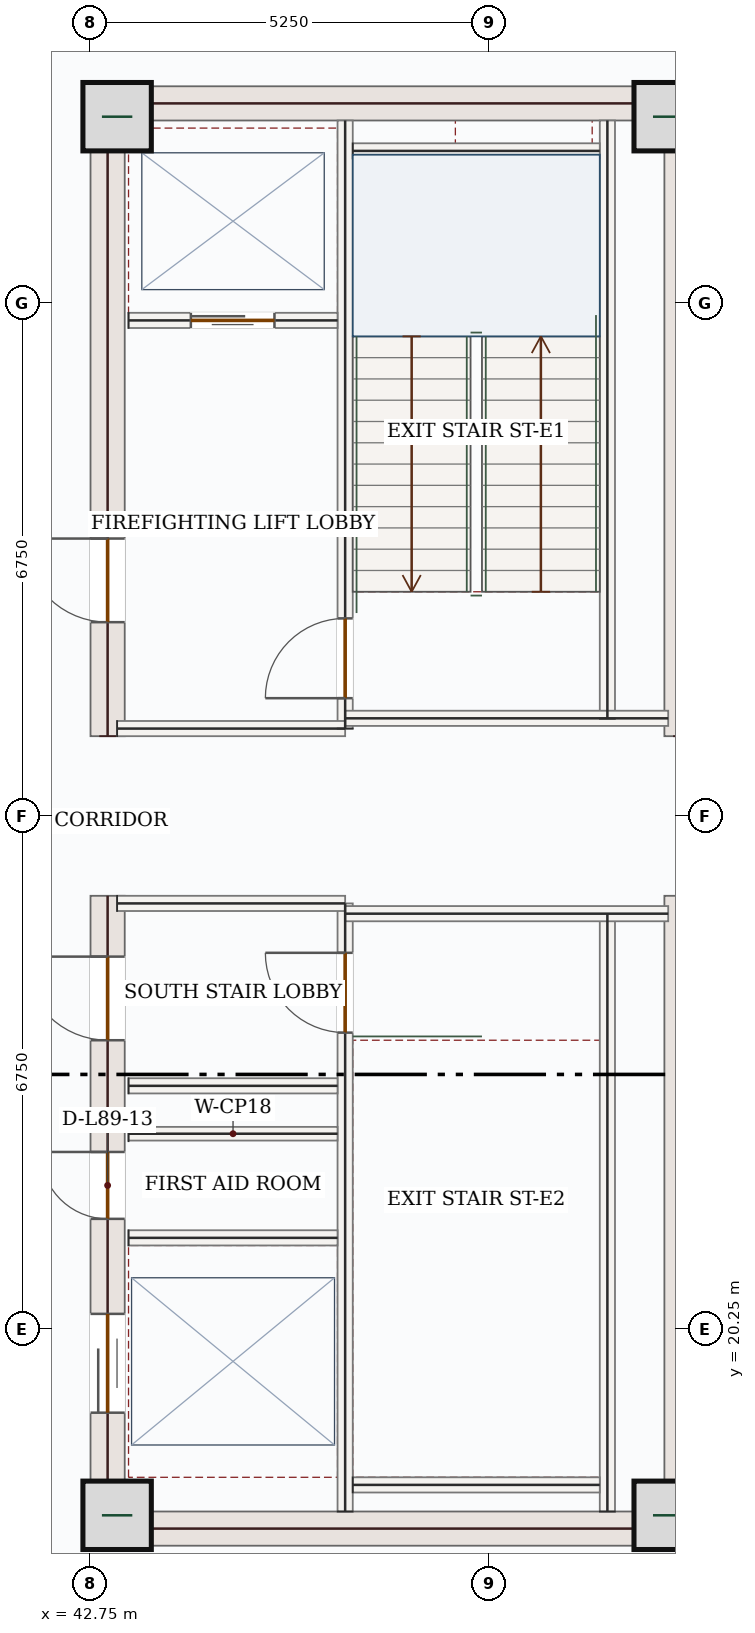
"""IFC4 building model, lengths in metres.
Left out: names, types, materials, properties, quantities, classifications, styles, units other than length and angle.
Written with IfcOpenShell. Run it as: python <this file> out.ifc"""

import sys

from ifc_helpers import new_model, si_unit, direction, frame, frame_2d, origin, origin_2d, place, context, subcontext, project, spatial, rectangle, extrude, source, transform, mapped, element, fill, save


model = new_model("IFC4")
c1 = context("Model", 3, precision=1e-05, world=origin(), true_north=direction((0.0, 1.0)))
c2 = subcontext(c1, "Body", "Model", "MODEL_VIEW")
j1 = project(units=[si_unit("LENGTHUNIT", "METRE"), si_unit("PLANEANGLEUNIT", "RADIAN")], contexts=[c1])
p1 = place(None, origin())
s1 = spatial("IfcSite", under=j1, at=p1, CompositionType="ELEMENT")
p2 = place(p1, origin())
s2 = spatial("IfcBuilding", under=s1, at=p2, CompositionType="ELEMENT")
p3 = place(p2, frame((0.0, 0.0, 365.85)))
s3 = spatial("IfcBuildingStorey", under=s2, at=p3, CompositionType="ELEMENT", Elevation=365.85)
p4 = place(p3, frame((42.975, 17.4, 0.0), z_axis=(0.0, 0.0, 1.0), x_axis=(0.0, 1.0, 0.0)))
e1 = element("IfcWall", 1, at=p4, inside=s3, PredefinedType="SHEAR", context=c2, shape_type="SweptSolid", body=[
    extrude(rectangle(XDim=8.55, YDim=0.45, at=frame_2d((4.275, 0.0))), origin(), (0.0, 0.0, 1.0), 4.55),
])
p5 = place(p4, frame((6.65, 0.0, 0.0)))
e2 = element("IfcOpeningElement", 2, at=p5, cuts=e1, PredefinedType="OPENING", context=c2, shape_type="SweptSolid", body=[
    extrude(rectangle(XDim=1.1, YDim=2.2, at=frame_2d((0.55, 1.1))), frame((0.0, 0.235, 0.0), z_axis=(0.0, -1.0, 0.0), x_axis=(1.0, 0.0, 0.0)), (0.0, 0.0, 1.0), 0.47),
])
p6 = place(p4, frame((1.75, 0.0, 0.0)))
e3 = element("IfcOpeningElement", 3, at=p6, cuts=e1, PredefinedType="OPENING", context=c2, shape_type="SweptSolid", body=[
    extrude(rectangle(XDim=1.3, YDim=2.2, at=frame_2d((0.65, 1.1))), frame((0.0, 0.235, 0.0), z_axis=(0.0, -1.0, 0.0), x_axis=(1.0, 0.0, 0.0)), (0.0, 0.0, 1.0), 0.47),
])
p7 = place(p4, frame((4.3, 0.0, 0.0)))
e4 = element("IfcOpeningElement", 4, at=p7, cuts=e1, PredefinedType="OPENING", context=c2, shape_type="SweptSolid", body=[
    extrude(rectangle(XDim=0.88, YDim=2.1, at=frame_2d((0.44, 1.05))), frame((0.0, 0.235, 0.0), z_axis=(0.0, -1.0, 0.0), x_axis=(1.0, 0.0, 0.0)), (0.0, 0.0, 1.0), 0.47),
])
p8 = place(p3, frame((42.975, 28.05, 0.0), z_axis=(0.0, 0.0, 1.0), x_axis=(0.0, 1.0, 0.0)))
e5 = element("IfcWall", 5, at=p8, inside=s3, PredefinedType="SHEAR", context=c2, shape_type="SweptSolid", body=[
    extrude(rectangle(XDim=8.55, YDim=0.45, at=frame_2d((4.275, 0.0))), origin(), (0.0, 0.0, 1.0), 4.55),
])
p9 = place(p8, frame((1.5, 0.0, 0.0)))
e6 = element("IfcOpeningElement", 6, at=p9, cuts=e5, PredefinedType="OPENING", context=c2, shape_type="SweptSolid", body=[
    extrude(rectangle(XDim=1.1, YDim=2.2, at=frame_2d((0.55, 1.1))), frame((0.0, 0.235, 0.0), z_axis=(0.0, -1.0, 0.0), x_axis=(1.0, 0.0, 0.0)), (0.0, 0.0, 1.0), 0.47),
])
m1 = source(origin(), c2, "Body", "SweptSolid", [
    extrude(rectangle(XDim=8.55, YDim=0.45, at=frame_2d((4.275, 0.0))), origin(), (0.0, 0.0, 1.0), 4.55),
])
for number, where, z_axis, x_axis in (
    (7, (50.525, 17.4, 0.0), (0.0, 0.0, 1.0), (0.0, 1.0, 0.0)),
    (8, (50.525, 28.05, 0.0), (0.0, 0.0, 1.0), (0.0, 1.0, 0.0)),
):
    element("IfcWall", number, at=place(p3, frame(where, z_axis=z_axis, x_axis=x_axis)), inside=s3, PredefinedType="SHEAR", context=c2, shape_type="MappedRepresentation", body=[
        mapped(m1, transform((0.0, 0.0, 0.0), x_axis=(1.0, 0.0, 0.0), y_axis=(0.0, 1.0, 0.0), z_axis=(0.0, 0.0, 1.0), scale=1.0)),
    ])
m2 = source(origin(), c2, "Body", "SweptSolid", [
    extrude(rectangle(XDim=7.1, YDim=0.45, at=frame_2d((3.55, 0.0))), origin(), (0.0, 0.0, 1.0), 4.55),
])
for number, where, z_axis, x_axis in (
    (9, (43.2, 17.625, 0.0), (0.0, 0.0, 1.0), (1.0, 0.0, 0.0)),
    (10, (43.2, 36.375, 0.0), (0.0, 0.0, 1.0), (1.0, 0.0, 0.0)),
):
    element("IfcWall", number, at=place(p3, frame(where, z_axis=z_axis, x_axis=x_axis)), inside=s3, PredefinedType="SHEAR", context=c2, shape_type="MappedRepresentation", body=[
        mapped(m2, transform((0.0, 0.0, 0.0), x_axis=(1.0, 0.0, 0.0), y_axis=(0.0, 1.0, 0.0), z_axis=(0.0, 0.0, 1.0), scale=1.0)),
    ])
m3 = source(origin(), c2, "Body", "SweptSolid", [
    extrude(rectangle(XDim=0.9, YDim=0.9, at=origin_2d()), origin(), (0.0, 0.0, 1.0), 4.8),
])
for number, where, z_axis, x_axis in (
    (11, (43.1, 17.8, 0.0), (0.0, 0.0, 1.0), (1.0, 0.0, 0.0)),
    (12, (50.35, 17.8, 0.0), (0.0, 0.0, 1.0), (1.0, 0.0, 0.0)),
    (13, (43.1, 36.2, 0.0), (0.0, 0.0, 1.0), (1.0, 0.0, 0.0)),
    (14, (50.35, 36.2, 0.0), (0.0, 0.0, 1.0), (1.0, 0.0, 0.0)),
):
    element("IfcColumn", number, at=place(p3, frame(where, z_axis=z_axis, x_axis=x_axis)), inside=s3, PredefinedType="COLUMN", context=c2, shape_type="MappedRepresentation", body=[
        mapped(m3, transform((0.0, 0.0, 0.0), x_axis=(1.0, 0.0, 0.0), y_axis=(0.0, 1.0, 0.0), z_axis=(0.0, 0.0, 1.0), scale=1.0)),
    ])
p10 = place(p3, frame((49.342, 39.26, 0.0), z_axis=(0.0, 0.0, 1.0), x_axis=(0.707106781187, -0.707106781187, 0.0)))
e15 = element("IfcWall", 15, at=p10, inside=s3, PredefinedType="SOLIDWALL", context=c2, shape_type="SweptSolid", body=[
    extrude(rectangle(XDim=5.258, YDim=0.28, at=frame_2d((2.629, 0.0))), origin(), (0.0, 0.0, 1.0), 4.55),
])
p11 = place(p10, frame((1.879, 0.0, 0.85)))
e16 = element("IfcOpeningElement", 16, at=p11, cuts=e15, PredefinedType="OPENING", context=c2, shape_type="SweptSolid", body=[
    extrude(rectangle(XDim=1.5, YDim=1.5, at=frame_2d((0.75, 0.75))), frame((0.0, 0.15, 0.0), z_axis=(0.0, -1.0, 0.0), x_axis=(1.0, 0.0, 0.0)), (0.0, 0.0, 1.0), 0.3),
])
p12 = place(p3, frame((53.06, 18.458, 0.0), z_axis=(0.0, 0.0, 1.0), x_axis=(-0.707106781187, -0.707106781187, 0.0)))
e17 = element("IfcWall", 17, at=p12, inside=s3, PredefinedType="SOLIDWALL", context=c2, shape_type="SweptSolid", body=[
    extrude(rectangle(XDim=5.258, YDim=0.28, at=frame_2d((2.629, 0.0))), origin(), (0.0, 0.0, 1.0), 4.55),
])
p13 = place(p12, frame((1.879, 0.0, 0.85)))
e18 = element("IfcOpeningElement", 18, at=p13, cuts=e17, PredefinedType="OPENING", context=c2, shape_type="SweptSolid", body=[
    extrude(rectangle(XDim=1.5, YDim=1.5, at=frame_2d((0.75, 0.75))), frame((0.0, 0.15, 0.0), z_axis=(0.0, -1.0, 0.0), x_axis=(1.0, 0.0, 0.0)), (0.0, 0.0, 1.0), 0.3),
])
m4 = source(origin(), c2, "Body", "SweptSolid", [
    extrude(rectangle(XDim=7.87, YDim=0.2, at=frame_2d((3.935, 0.0))), origin(), (0.0, 0.0, 1.0), 4.55),
])
for number, where, z_axis, x_axis in (
    (19, (49.55, 17.85, 0.0), (0.0, 0.0, 1.0), (0.0, 1.0, 0.0)),
    (20, (49.55, 28.28, 0.0), (0.0, 0.0, 1.0), (0.0, 1.0, 0.0)),
):
    element("IfcWall", number, at=place(p3, frame(where, z_axis=z_axis, x_axis=x_axis)), inside=s3, PredefinedType="SOLIDWALL", context=c2, shape_type="MappedRepresentation", body=[
        mapped(m4, transform((0.0, 0.0, 0.0), x_axis=(1.0, 0.0, 0.0), y_axis=(0.0, 1.0, 0.0), z_axis=(0.0, 0.0, 1.0), scale=1.0)),
    ])
p14 = place(p3, frame((46.1, 17.85, 0.0), z_axis=(0.0, 0.0, 1.0), x_axis=(0.0, 1.0, 0.0)))
e21 = element("IfcWall", 21, at=p14, inside=s3, PredefinedType="SOLIDWALL", context=c2, shape_type="SweptSolid", body=[
    extrude(rectangle(XDim=8.0, YDim=0.2, at=frame_2d((4.0, 0.0))), origin(), (0.0, 0.0, 1.0), 4.55),
])
p15 = place(p14, frame((6.3, 0.0, 0.0)))
e22 = element("IfcOpeningElement", 22, at=p15, cuts=e21, PredefinedType="OPENING", context=c2, shape_type="SweptSolid", body=[
    extrude(rectangle(XDim=1.05, YDim=2.15, at=frame_2d((0.525, 1.075))), frame((0.0, 0.11, 0.0), z_axis=(0.0, -1.0, 0.0), x_axis=(1.0, 0.0, 0.0)), (0.0, 0.0, 1.0), 0.22),
])
p16 = place(p3, frame((46.1, 28.15, 0.0), z_axis=(0.0, 0.0, 1.0), x_axis=(0.0, 1.0, 0.0)))
e23 = element("IfcWall", 23, at=p16, inside=s3, PredefinedType="SOLIDWALL", context=c2, shape_type="SweptSolid", body=[
    extrude(rectangle(XDim=8.0, YDim=0.2, at=frame_2d((4.0, 0.0))), origin(), (0.0, 0.0, 1.0), 4.55),
])
p17 = place(p16, frame((0.4, 0.0, 0.0)))
e24 = element("IfcOpeningElement", 24, at=p17, cuts=e23, PredefinedType="OPENING", context=c2, shape_type="SweptSolid", body=[
    extrude(rectangle(XDim=1.05, YDim=2.15, at=frame_2d((0.525, 1.075))), frame((0.0, 0.11, 0.0), z_axis=(0.0, -1.0, 0.0), x_axis=(1.0, 0.0, 0.0)), (0.0, 0.0, 1.0), 0.22),
])
m5 = source(origin(), c2, "Body", "SweptSolid", [
    extrude(rectangle(XDim=3.0, YDim=0.2, at=frame_2d((1.5, 0.0))), origin(), (0.0, 0.0, 1.0), 4.55),
])
p18 = place(p3, frame((43.1, 25.85, 0.0), z_axis=(0.0, 0.0, 1.0), x_axis=(1.0, 0.0, 0.0)))
e25 = element("IfcWall", 25, at=p18, inside=s3, PredefinedType="SOLIDWALL", context=c2, shape_type="MappedRepresentation", body=[
    mapped(m5, transform((0.0, 0.0, 0.0), x_axis=(1.0, 0.0, 0.0), y_axis=(0.0, 1.0, 0.0), z_axis=(0.0, 0.0, 1.0), scale=1.0)),
])
m6 = source(origin(), c2, "Body", "SweptSolid", [
    extrude(rectangle(XDim=4.25, YDim=0.2, at=frame_2d((2.125, 0.0))), origin(), (0.0, 0.0, 1.0), 4.55),
])
p19 = place(p3, frame((46.1, 25.715, 0.0), z_axis=(0.0, 0.0, 1.0), x_axis=(1.0, 0.0, 0.0)))
e26 = element("IfcWall", 26, at=p19, inside=s3, PredefinedType="SOLIDWALL", context=c2, shape_type="MappedRepresentation", body=[
    mapped(m6, transform((0.0, 0.0, 0.0), x_axis=(1.0, 0.0, 0.0), y_axis=(0.0, 1.0, 0.0), z_axis=(0.0, 0.0, 1.0), scale=1.0)),
])
p20 = place(p3, frame((43.1, 28.15, 0.0), z_axis=(0.0, 0.0, 1.0), x_axis=(1.0, 0.0, 0.0)))
e27 = element("IfcWall", 27, at=p20, inside=s3, PredefinedType="SOLIDWALL", context=c2, shape_type="MappedRepresentation", body=[
    mapped(m5, transform((0.0, 0.0, 0.0), x_axis=(1.0, 0.0, 0.0), y_axis=(0.0, 1.0, 0.0), z_axis=(0.0, 0.0, 1.0), scale=1.0)),
])
p21 = place(p3, frame((46.1, 28.285, 0.0), z_axis=(0.0, 0.0, 1.0), x_axis=(1.0, 0.0, 0.0)))
e28 = element("IfcWall", 28, at=p21, inside=s3, PredefinedType="SOLIDWALL", context=c2, shape_type="MappedRepresentation", body=[
    mapped(m6, transform((0.0, 0.0, 0.0), x_axis=(1.0, 0.0, 0.0), y_axis=(0.0, 1.0, 0.0), z_axis=(0.0, 0.0, 1.0), scale=1.0)),
])
m7 = source(origin(), c2, "Body", "SweptSolid", [
    extrude(rectangle(XDim=3.25, YDim=0.2, at=frame_2d((1.625, 0.0))), origin(), (0.0, 0.0, 1.0), 4.55),
])
for number, where, z_axis, x_axis in (
    (29, (46.2, 35.75, 0.0), (0.0, 0.0, 1.0), (1.0, 0.0, 0.0)),
    (30, (46.2, 18.2, 0.0), (0.0, 0.0, 1.0), (1.0, 0.0, 0.0)),
):
    element("IfcWall", number, at=place(p3, frame(where, z_axis=z_axis, x_axis=x_axis)), inside=s3, PredefinedType="SOLIDWALL", context=c2, shape_type="MappedRepresentation", body=[
        mapped(m7, transform((0.0, 0.0, 0.0), x_axis=(1.0, 0.0, 0.0), y_axis=(0.0, 1.0, 0.0), z_axis=(0.0, 0.0, 1.0), scale=1.0)),
    ])
p22 = place(p3, frame((43.25, 33.52, 0.0), z_axis=(0.0, 0.0, 1.0), x_axis=(1.0, 0.0, 0.0)))
e31 = element("IfcWall", 31, at=p22, inside=s3, PredefinedType="SOLIDWALL", context=c2, shape_type="SweptSolid", body=[
    extrude(rectangle(XDim=2.75, YDim=0.2, at=frame_2d((1.375, 0.0))), origin(), (0.0, 0.0, 1.0), 4.55),
])
p23 = place(p22, frame((0.82, 0.0, 0.0)))
e32 = element("IfcOpeningElement", 32, at=p23, cuts=e31, PredefinedType="OPENING", context=c2, shape_type="SweptSolid", body=[
    extrude(rectangle(XDim=1.1, YDim=2.15, at=frame_2d((0.55, 1.075))), frame((0.0, 0.11, 0.0), z_axis=(0.0, -1.0, 0.0), x_axis=(1.0, 0.0, 0.0)), (0.0, 0.0, 1.0), 0.22),
])
m8 = source(origin(), c2, "Body", "SweptSolid", [
    extrude(rectangle(XDim=2.75, YDim=0.2, at=frame_2d((1.375, 0.0))), origin(), (0.0, 0.0, 1.0), 4.55),
])
for number, where, z_axis, x_axis in (
    (33, (43.25, 23.45, 0.0), (0.0, 0.0, 1.0), (1.0, 0.0, 0.0)),
    (34, (43.25, 21.45, 0.0), (0.0, 0.0, 1.0), (1.0, 0.0, 0.0)),
):
    element("IfcWall", number, at=place(p3, frame(where, z_axis=z_axis, x_axis=x_axis)), inside=s3, PredefinedType="SOLIDWALL", context=c2, shape_type="MappedRepresentation", body=[
        mapped(m8, transform((0.0, 0.0, 0.0), x_axis=(1.0, 0.0, 0.0), y_axis=(0.0, 1.0, 0.0), z_axis=(0.0, 0.0, 1.0), scale=1.0)),
    ])
m9 = source(origin(), c2, "Body", "SweptSolid", [
    extrude(rectangle(XDim=2.75, YDim=0.18, at=frame_2d((1.375, 0.0))), origin(), (0.0, 0.0, 1.0), 4.55),
])
p24 = place(p3, frame((43.25, 22.82, 0.0), z_axis=(0.0, 0.0, 1.0), x_axis=(1.0, 0.0, 0.0)))
e35 = element("IfcWall", 35, at=p24, inside=s3, PredefinedType="PARTITIONING", context=c2, shape_type="MappedRepresentation", body=[
    mapped(m9, transform((0.0, 0.0, 0.0), x_axis=(1.0, 0.0, 0.0), y_axis=(0.0, 1.0, 0.0), z_axis=(0.0, 0.0, 1.0), scale=1.0)),
])
m10 = source(origin(), c2, "Body", "SweptSolid", [
    extrude(rectangle(XDim=1.05, YDim=2.15, at=frame_2d((0.525, 1.075))), frame((0.0, 0.025, 0.0), z_axis=(0.0, -1.0, 0.0), x_axis=(1.0, 0.0, 0.0)), (0.0, 0.0, 1.0), 0.05),
])
p25 = place(p17, origin())
e36 = element("IfcDoor", 36, at=p25, inside=s3, OperationType="SINGLE_SWING_LEFT", PredefinedType="DOOR", context=c2, shape_type="MappedRepresentation", body=[
    mapped(m10, transform((0.0, 0.0, 0.0), x_axis=(1.0, 0.0, 0.0), y_axis=(0.0, 1.0, 0.0), z_axis=(0.0, 0.0, 1.0), scale=1.0)),
])
fill(e24, e36)
p26 = place(p15, origin())
e37 = element("IfcDoor", 37, at=p26, inside=s3, OperationType="SINGLE_SWING_RIGHT", PredefinedType="DOOR", context=c2, shape_type="MappedRepresentation", body=[
    mapped(m10, transform((0.0, 0.0, 0.0), x_axis=(1.0, 0.0, 0.0), y_axis=(0.0, 1.0, 0.0), z_axis=(0.0, 0.0, 1.0), scale=1.0)),
])
fill(e22, e37)
m11 = source(origin(), c2, "Body", "SweptSolid", [
    extrude(rectangle(XDim=1.1, YDim=2.15, at=frame_2d((0.55, 1.075))), frame((0.0, 0.025, 0.0), z_axis=(0.0, -1.0, 0.0), x_axis=(1.0, 0.0, 0.0)), (0.0, 0.0, 1.0), 0.05),
])
p27 = place(p23, origin())
e38 = element("IfcDoor", 38, at=p27, inside=s3, OperationType="DOUBLE_DOOR_SLIDING", PredefinedType="DOOR", context=c2, shape_type="MappedRepresentation", body=[
    mapped(m11, transform((0.0, 0.0, 0.0), x_axis=(1.0, 0.0, 0.0), y_axis=(0.0, 1.0, 0.0), z_axis=(0.0, 0.0, 1.0), scale=1.0)),
])
fill(e32, e38)
m12 = source(origin(), c2, "Body", "SweptSolid", [
    extrude(rectangle(XDim=1.1, YDim=2.2, at=frame_2d((0.55, 1.1))), frame((0.0, 0.025, 0.0), z_axis=(0.0, -1.0, 0.0), x_axis=(1.0, 0.0, 0.0)), (0.0, 0.0, 1.0), 0.05),
])
p28 = place(p9, origin())
e39 = element("IfcDoor", 39, at=p28, inside=s3, OperationType="SINGLE_SWING_RIGHT", PredefinedType="DOOR", context=c2, shape_type="MappedRepresentation", body=[
    mapped(m12, transform((0.0, 0.0, 0.0), x_axis=(1.0, 0.0, 0.0), y_axis=(0.0, 1.0, 0.0), z_axis=(0.0, 0.0, 1.0), scale=1.0)),
])
fill(e6, e39)
p29 = place(p5, origin())
e40 = element("IfcDoor", 40, at=p29, inside=s3, OperationType="SINGLE_SWING_RIGHT", PredefinedType="DOOR", context=c2, shape_type="MappedRepresentation", body=[
    mapped(m12, transform((0.0, 0.0, 0.0), x_axis=(1.0, 0.0, 0.0), y_axis=(0.0, 1.0, 0.0), z_axis=(0.0, 0.0, 1.0), scale=1.0)),
])
fill(e2, e40)
m13 = source(origin(), c2, "Body", "SweptSolid", [
    extrude(rectangle(XDim=1.3, YDim=2.2, at=frame_2d((0.65, 1.1))), frame((0.0, 0.025, 0.0), z_axis=(0.0, -1.0, 0.0), x_axis=(1.0, 0.0, 0.0)), (0.0, 0.0, 1.0), 0.05),
])
p30 = place(p6, origin())
e41 = element("IfcDoor", 41, at=p30, inside=s3, OperationType="DOUBLE_DOOR_SLIDING", PredefinedType="DOOR", context=c2, shape_type="MappedRepresentation", body=[
    mapped(m13, transform((0.0, 0.0, 0.0), x_axis=(1.0, 0.0, 0.0), y_axis=(0.0, 1.0, 0.0), z_axis=(0.0, 0.0, 1.0), scale=1.0)),
])
fill(e3, e41)
m14 = source(origin(), c2, "Body", "SweptSolid", [
    extrude(rectangle(XDim=0.88, YDim=2.1, at=frame_2d((0.44, 1.05))), frame((0.0, 0.025, 0.0), z_axis=(0.0, -1.0, 0.0), x_axis=(1.0, 0.0, 0.0)), (0.0, 0.0, 1.0), 0.05),
])
p31 = place(p7, origin())
e42 = element("IfcDoor", 42, at=p31, inside=s3, OperationType="SINGLE_SWING_RIGHT", PredefinedType="DOOR", context=c2, shape_type="MappedRepresentation", body=[
    mapped(m14, transform((0.0, 0.0, 0.0), x_axis=(1.0, 0.0, 0.0), y_axis=(0.0, 1.0, 0.0), z_axis=(0.0, 0.0, 1.0), scale=1.0)),
])
fill(e4, e42)
save(model, sys.argv[1])
